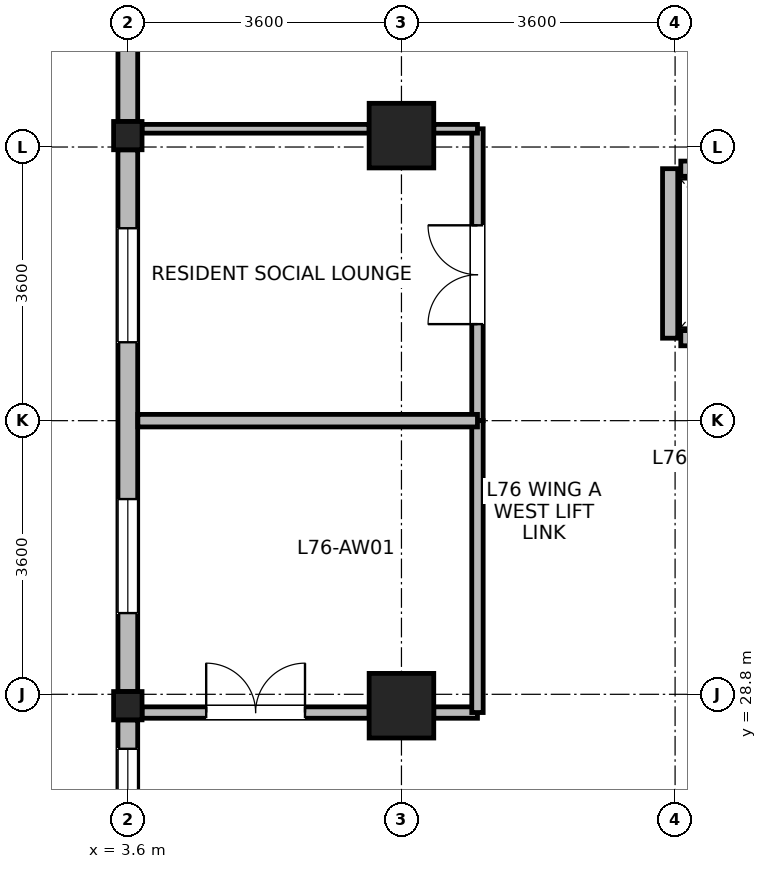
"""IFC4 building model, lengths in metres.
Left out: names, types, materials, properties, quantities, classifications, styles, units other than length and angle.
Written with IfcOpenShell. Run it as: python <this file> out.ifc"""

import sys

from ifc_helpers import new_model, si_unit, direction, frame, frame_2d, origin, origin_2d, place, context, subcontext, project, spatial, rectangle, i_section, extrude, source, transform, mapped, element, fill, save


model = new_model("IFC4")
c1 = context("Model", 3, precision=1e-05, world=origin(), true_north=direction((0.0, 1.0)))
c2 = subcontext(c1, "Body", "Model", "MODEL_VIEW")
j1 = project(units=[si_unit("LENGTHUNIT", "METRE"), si_unit("PLANEANGLEUNIT", "RADIAN")], contexts=[c1])
p1 = place(None, origin())
s1 = spatial("IfcSite", under=j1, at=p1, CompositionType="ELEMENT")
p2 = place(p1, origin())
s2 = spatial("IfcBuilding", under=s1, at=p2, CompositionType="ELEMENT")
p3 = place(p2, frame((0.0, 0.0, 294.3)))
s3 = spatial("IfcBuildingStorey", under=s2, at=p3, CompositionType="ELEMENT", Elevation=294.3)
m1 = source(origin(), c2, "Body", "SweptSolid", [
    extrude(rectangle(XDim=0.85, YDim=0.85, at=origin_2d()), origin(), (0.0, 0.0, 1.0), 3.7),
])
for number, where, z_axis, x_axis in (
    (1, (7.2, 28.65, 0.0), (0.0, 0.0, 1.0), (1.0, 0.0, 0.0)),
    (2, (7.2, 36.15, 0.0), (0.0, 0.0, 1.0), (1.0, 0.0, 0.0)),
):
    element("IfcColumn", number, at=place(p3, frame(where, z_axis=z_axis, x_axis=x_axis)), inside=s3, PredefinedType="COLUMN", context=c2, shape_type="MappedRepresentation", body=[
        mapped(m1, transform((0.0, 0.0, 0.0), x_axis=(1.0, 0.0, 0.0), y_axis=(0.0, 1.0, 0.0), z_axis=(0.0, 0.0, 1.0), scale=1.0)),
    ])
m2 = source(origin(), c2, "Body", "SweptSolid", [
    extrude(i_section(OverallWidth=0.374, OverallDepth=0.372, WebThickness=0.015, FlangeThickness=0.026, FilletRadius=0.015, at=origin_2d()), origin(), (0.0, 0.0, 1.0), 3.7),
])
for number, where, z_axis, x_axis in (
    (3, (3.6, 28.65, 0.0), (0.0, 0.0, 1.0), (1.0, 0.0, 0.0)),
    (4, (3.6, 36.15, 0.0), (0.0, 0.0, 1.0), (1.0, 0.0, 0.0)),
):
    element("IfcColumn", number, at=place(p3, frame(where, z_axis=z_axis, x_axis=x_axis)), inside=s3, PredefinedType="COLUMN", context=c2, shape_type="MappedRepresentation", body=[
        mapped(m2, transform((0.0, 0.0, 0.0), x_axis=(1.0, 0.0, 0.0), y_axis=(0.0, 1.0, 0.0), z_axis=(0.0, 0.0, 1.0), scale=1.0)),
    ])
p4 = place(p3, frame((3.6, 36.337, 0.0), z_axis=(0.0, 0.0, 1.0), x_axis=(0.0, 1.0, 0.0)))
e5 = element("IfcWall", 5, at=p4, inside=s3, PredefinedType="STANDARD", context=c2, shape_type="SweptSolid", body=[
    extrude(rectangle(XDim=3.393, YDim=0.26, at=frame_2d((1.697, 0.0))), origin(), (0.0, 0.0, 1.0), 3.38),
])
p5 = place(p4, frame((0.947, 0.0, 0.85)))
e6 = element("IfcOpeningElement", 6, at=p5, cuts=e5, PredefinedType="OPENING", context=c2, shape_type="SweptSolid", body=[
    extrude(rectangle(XDim=1.5, YDim=1.85, at=frame_2d((0.75, 0.925))), frame((0.0, 0.14, 0.0), z_axis=(0.0, -1.0, 0.0), x_axis=(1.0, 0.0, 0.0)), (0.0, 0.0, 1.0), 0.28),
])
p6 = place(p3, frame((3.6, 28.837, 0.0), z_axis=(0.0, 0.0, 1.0), x_axis=(0.0, 1.0, 0.0)))
e7 = element("IfcWall", 7, at=p6, inside=s3, PredefinedType="STANDARD", context=c2, shape_type="SweptSolid", body=[
    extrude(rectangle(XDim=7.126, YDim=0.26, at=frame_2d((3.563, 0.0))), origin(), (0.0, 0.0, 1.0), 2.98),
])
p7 = place(p6, frame((1.031, 0.0, 0.85)))
e8 = element("IfcOpeningElement", 8, at=p7, cuts=e7, PredefinedType="OPENING", context=c2, shape_type="SweptSolid", body=[
    extrude(rectangle(XDim=1.5, YDim=1.85, at=frame_2d((0.75, 0.925))), frame((0.0, 0.14, 0.0), z_axis=(0.0, -1.0, 0.0), x_axis=(1.0, 0.0, 0.0)), (0.0, 0.0, 1.0), 0.28),
])
p8 = place(p6, frame((4.594, 0.0, 0.85)))
e9 = element("IfcOpeningElement", 9, at=p8, cuts=e7, PredefinedType="OPENING", context=c2, shape_type="SweptSolid", body=[
    extrude(rectangle(XDim=1.5, YDim=1.85, at=frame_2d((0.75, 0.925))), frame((0.0, 0.14, 0.0), z_axis=(0.0, -1.0, 0.0), x_axis=(1.0, 0.0, 0.0)), (0.0, 0.0, 1.0), 0.28),
])
p9 = place(p3, frame((3.6, 25.07, 0.0), z_axis=(0.0, 0.0, 1.0), x_axis=(0.0, 1.0, 0.0)))
e10 = element("IfcWall", 10, at=p9, inside=s3, PredefinedType="STANDARD", context=c2, shape_type="SweptSolid", body=[
    extrude(rectangle(XDim=3.393, YDim=0.26, at=frame_2d((1.696, 0.0))), origin(), (0.0, 0.0, 1.0), 3.38),
])
p10 = place(p9, frame((2.063, 0.0, 0.85)))
e11 = element("IfcOpeningElement", 11, at=p10, cuts=e10, PredefinedType="OPENING", context=c2, shape_type="SweptSolid", body=[
    extrude(rectangle(XDim=0.95, YDim=1.75, at=frame_2d((0.475, 0.875))), frame((0.0, 0.14, 0.0), z_axis=(0.0, -1.0, 0.0), x_axis=(1.0, 0.0, 0.0)), (0.0, 0.0, 1.0), 0.28),
])
p11 = place(p3, frame((10.875, 33.485, 0.0), z_axis=(0.0, 0.0, 1.0), x_axis=(1.0, 0.0, 0.0)))
e12 = element("IfcWall", 12, at=p11, inside=s3, PredefinedType="PARTITIONING", context=c2, shape_type="SweptSolid", body=[
    extrude(rectangle(XDim=1.65, YDim=0.2, at=frame_2d((0.825, 0.0))), origin(), (0.0, 0.0, 1.0), 3.38),
])
p12 = place(p11, frame((0.275, 0.0, 0.0)))
e13 = element("IfcOpeningElement", 13, at=p12, cuts=e12, PredefinedType="OPENING", context=c2, shape_type="SweptSolid", body=[
    extrude(rectangle(XDim=1.1, YDim=2.12, at=frame_2d((0.55, 1.06))), frame((0.0, 0.11, 0.0), z_axis=(0.0, -1.0, 0.0), x_axis=(1.0, 0.0, 0.0)), (0.0, 0.0, 1.0), 0.22),
])
p13 = place(p3, frame((10.875, 35.715, 0.0), z_axis=(0.0, 0.0, 1.0), x_axis=(1.0, 0.0, 0.0)))
e14 = element("IfcWall", 14, at=p13, inside=s3, PredefinedType="PARTITIONING", context=c2, shape_type="SweptSolid", body=[
    extrude(rectangle(XDim=1.65, YDim=0.2, at=frame_2d((0.825, 0.0))), origin(), (0.0, 0.0, 1.0), 3.38),
])
p14 = place(p3, frame((10.735, 33.485, 0.0), z_axis=(0.0, 0.0, 1.0), x_axis=(0.0, 1.0, 0.0)))
e15 = element("IfcWall", 15, at=p14, inside=s3, PredefinedType="PARTITIONING", context=c2, shape_type="SweptSolid", body=[
    extrude(rectangle(XDim=2.23, YDim=0.2, at=frame_2d((1.115, 0.0))), origin(), (0.0, 0.0, 1.0), 3.38),
])
p15 = place(p3, frame((3.787, 28.56, 0.0), z_axis=(0.0, 0.0, 1.0), x_axis=(1.0, 0.0, 0.0)))
e16 = element("IfcWall", 16, at=p15, inside=s3, PredefinedType="PARTITIONING", context=c2, shape_type="SweptSolid", body=[
    extrude(rectangle(XDim=2.988, YDim=0.15, at=frame_2d((1.494, 0.0))), origin(), (0.0, 0.0, 1.0), 2.83),
])
p16 = place(p15, frame((0.844, 0.0, 0.0)))
e17 = element("IfcOpeningElement", 17, at=p16, cuts=e16, PredefinedType="OPENING", context=c2, shape_type="SweptSolid", body=[
    extrude(rectangle(XDim=1.3, YDim=2.12, at=frame_2d((0.65, 1.06))), frame((0.0, 0.085, 0.0), z_axis=(0.0, -1.0, 0.0), x_axis=(1.0, 0.0, 0.0)), (0.0, 0.0, 1.0), 0.17),
])
p17 = place(p3, frame((7.625, 28.56, 0.0), z_axis=(0.0, 0.0, 1.0), x_axis=(1.0, 0.0, 0.0)))
e18 = element("IfcWall", 18, at=p17, inside=s3, PredefinedType="PARTITIONING", context=c2, shape_type="SweptSolid", body=[
    extrude(rectangle(XDim=0.575, YDim=0.15, at=frame_2d((0.288, 0.0))), origin(), (0.0, 0.0, 1.0), 2.83),
])
p18 = place(p3, frame((8.2, 32.4, 0.0), z_axis=(0.0, 0.0, 1.0), x_axis=(0.0, 1.0, 0.0)))
e19 = element("IfcWall", 19, at=p18, inside=s3, PredefinedType="PARTITIONING", context=c2, shape_type="SweptSolid", body=[
    extrude(rectangle(XDim=3.84, YDim=0.15, at=frame_2d((1.92, 0.0))), origin(), (0.0, 0.0, 1.0), 3.38),
])
p19 = place(p18, frame((1.27, 0.0, 0.0)))
e20 = element("IfcOpeningElement", 20, at=p19, cuts=e19, PredefinedType="OPENING", context=c2, shape_type="SweptSolid", body=[
    extrude(rectangle(XDim=1.3, YDim=2.12, at=frame_2d((0.65, 1.06))), frame((0.0, 0.085, 0.0), z_axis=(0.0, -1.0, 0.0), x_axis=(1.0, 0.0, 0.0)), (0.0, 0.0, 1.0), 0.17),
])
p20 = place(p3, frame((8.2, 28.56, 0.0), z_axis=(0.0, 0.0, 1.0), x_axis=(0.0, 1.0, 0.0)))
e21 = element("IfcWall", 21, at=p20, inside=s3, PredefinedType="PARTITIONING", context=c2, shape_type="SweptSolid", body=[
    extrude(rectangle(XDim=3.84, YDim=0.15, at=frame_2d((1.92, 0.0))), origin(), (0.0, 0.0, 1.0), 3.38),
])
p21 = place(p3, frame((3.732, 32.4, 0.0), z_axis=(0.0, 0.0, 1.0), x_axis=(1.0, 0.0, 0.0)))
e22 = element("IfcWall", 22, at=p21, inside=s3, PredefinedType="PARTITIONING", context=c2, shape_type="SweptSolid", body=[
    extrude(rectangle(XDim=4.468, YDim=0.165, at=frame_2d((2.234, 0.0))), origin(), (0.0, 0.0, 1.0), 3.38),
])
p22 = place(p3, frame((3.787, 36.24, 0.0), z_axis=(0.0, 0.0, 1.0), x_axis=(1.0, 0.0, 0.0)))
e23 = element("IfcWall", 23, at=p22, inside=s3, PredefinedType="PARTITIONING", context=c2, shape_type="SweptSolid", body=[
    extrude(rectangle(XDim=2.988, YDim=0.115, at=frame_2d((1.494, 0.0))), origin(), (0.0, 0.0, 1.0), 2.83),
])
p23 = place(p3, frame((7.625, 36.24, 0.0), z_axis=(0.0, 0.0, 1.0), x_axis=(1.0, 0.0, 0.0)))
e24 = element("IfcWall", 24, at=p23, inside=s3, PredefinedType="PARTITIONING", context=c2, shape_type="SweptSolid", body=[
    extrude(rectangle(XDim=0.575, YDim=0.115, at=frame_2d((0.288, 0.0))), origin(), (0.0, 0.0, 1.0), 2.83),
])
p24 = place(p7, origin())
e25 = element("IfcWindow", 25, at=p24, inside=s3, PartitioningType="SINGLE_PANEL", PredefinedType="WINDOW", context=c2, shape_type="SweptSolid", body=[
    extrude(rectangle(XDim=1.5, YDim=1.85, at=frame_2d((0.75, 0.925))), frame((0.0, 0.03, 0.0), z_axis=(0.0, -1.0, 0.0), x_axis=(1.0, 0.0, 0.0)), (0.0, 0.0, 1.0), 0.06),
])
fill(e8, e25)
p25 = place(p8, origin())
e26 = element("IfcWindow", 26, at=p25, inside=s3, PartitioningType="SINGLE_PANEL", PredefinedType="WINDOW", context=c2, shape_type="SweptSolid", body=[
    extrude(rectangle(XDim=1.5, YDim=1.85, at=frame_2d((0.75, 0.925))), frame((0.0, 0.03, 0.0), z_axis=(0.0, -1.0, 0.0), x_axis=(1.0, 0.0, 0.0)), (0.0, 0.0, 1.0), 0.06),
])
fill(e9, e26)
p26 = place(p10, origin())
e27 = element("IfcWindow", 27, at=p26, inside=s3, PartitioningType="SINGLE_PANEL", PredefinedType="WINDOW", context=c2, shape_type="SweptSolid", body=[
    extrude(rectangle(XDim=0.95, YDim=1.75, at=frame_2d((0.475, 0.875))), frame((0.0, 0.03, 0.0), z_axis=(0.0, -1.0, 0.0), x_axis=(1.0, 0.0, 0.0)), (0.0, 0.0, 1.0), 0.06),
])
fill(e11, e27)
p27 = place(p16, origin())
e28 = element("IfcDoor", 28, at=p27, inside=s3, OperationType="DOUBLE_DOOR_SINGLE_SWING", PredefinedType="DOOR", context=c2, shape_type="SweptSolid", body=[
    extrude(rectangle(XDim=1.3, YDim=2.12, at=frame_2d((0.65, 1.06))), frame((0.0, 0.025, 0.0), z_axis=(0.0, -1.0, 0.0), x_axis=(1.0, 0.0, 0.0)), (0.0, 0.0, 1.0), 0.05),
])
fill(e17, e28)
p28 = place(p19, origin())
e29 = element("IfcDoor", 29, at=p28, inside=s3, OperationType="DOUBLE_DOOR_SINGLE_SWING", PredefinedType="DOOR", context=c2, shape_type="SweptSolid", body=[
    extrude(rectangle(XDim=1.3, YDim=2.12, at=frame_2d((0.65, 1.06))), frame((0.0, 0.025, 0.0), z_axis=(0.0, -1.0, 0.0), x_axis=(1.0, 0.0, 0.0)), (0.0, 0.0, 1.0), 0.05),
])
fill(e20, e29)
save(model, sys.argv[1])
